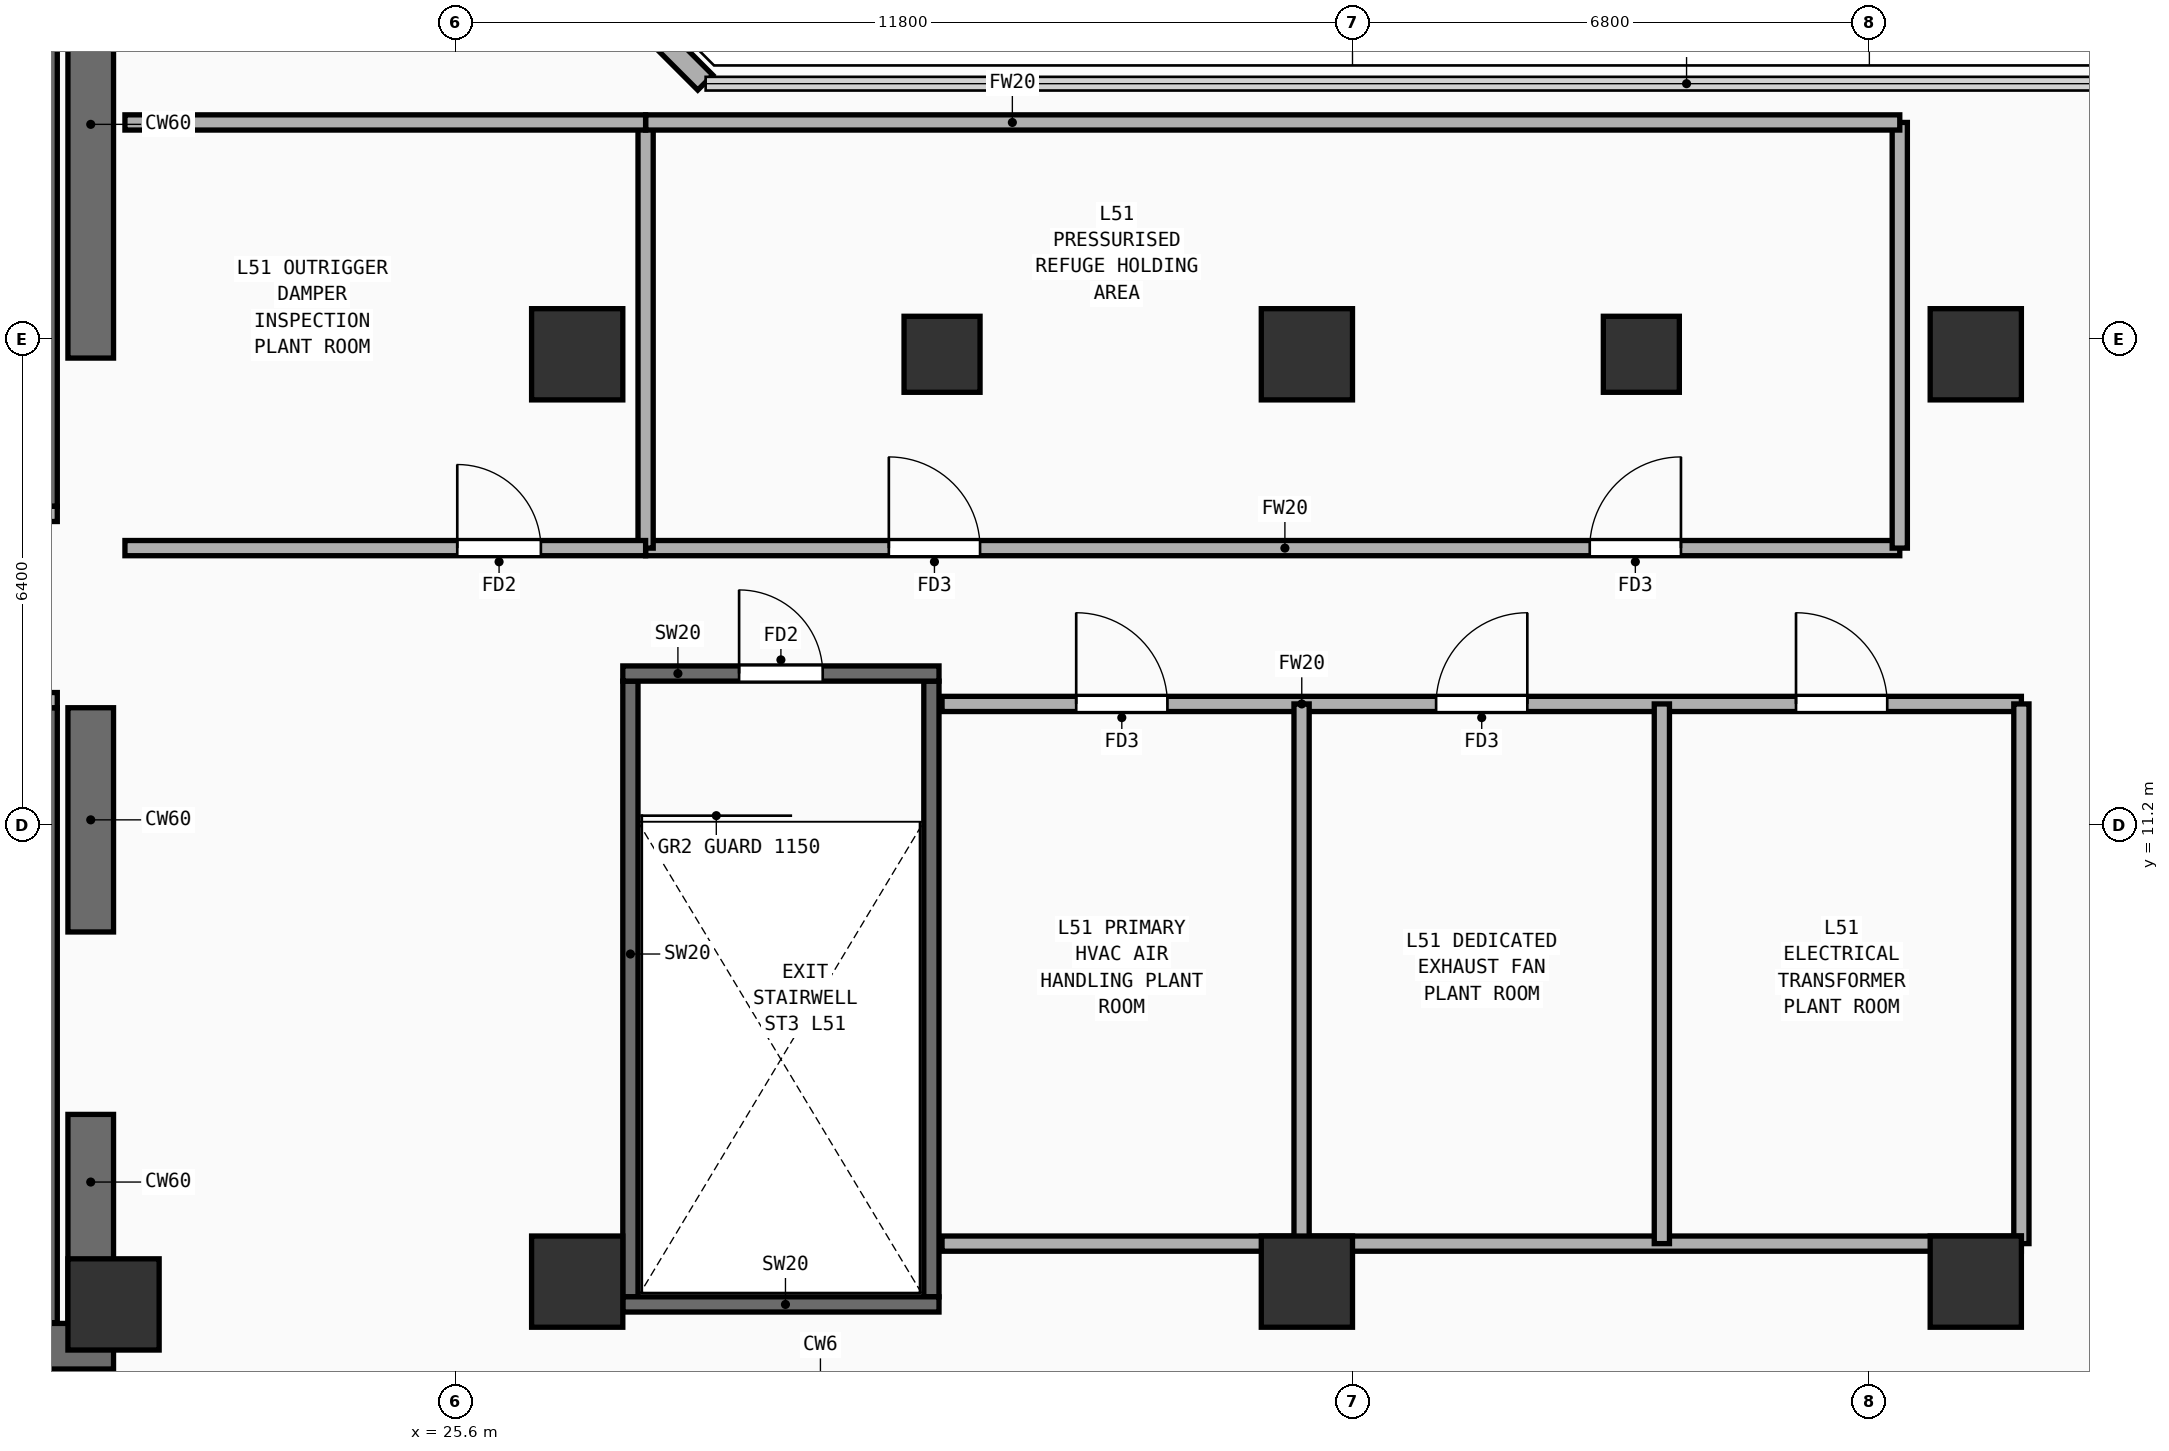
"""IFC4 building model, lengths in metres.
Left out: names, types, materials, properties, quantities, classifications, styles, units other than length and angle.
Written with IfcOpenShell. Run it as: python <this file> out.ifc"""

import sys

from ifc_helpers import new_model, si_unit, direction, frame, frame_2d, origin, origin_2d, place, context, subcontext, project, spatial, rectangle, extrude, element, fill, save


model = new_model("IFC4")
c1 = context("Model", 3, precision=1e-05, world=origin(), true_north=direction((0.0, 1.0)))
c2 = subcontext(c1, "Body", "Model", "MODEL_VIEW")
j1 = project(units=[si_unit("LENGTHUNIT", "METRE"), si_unit("PLANEANGLEUNIT", "RADIAN")], contexts=[c1])
p1 = place(None, origin())
s1 = spatial("IfcSite", under=j1, at=p1, CompositionType="ELEMENT")
p2 = place(p1, origin())
s2 = spatial("IfcBuilding", under=s1, at=p2, CompositionType="ELEMENT")
p3 = place(p2, frame((0.0, 0.0, 199.4)))
s3 = spatial("IfcBuildingStorey", under=s2, at=p3, CompositionType="ELEMENT", Elevation=199.4)
p4 = place(p3, frame((7.15, 4.35, 0.0), z_axis=(0.0, 0.0, 1.0), x_axis=(1.0, 0.0, 0.0)))
e1 = element("IfcWall", 1, at=p4, inside=s3, PredefinedType="SHEAR", context=c2, shape_type="SweptSolid", body=[
    extrude(rectangle(XDim=13.95, YDim=0.6, at=frame_2d((6.975, 0.0))), origin(), (0.0, 0.0, 1.0), 4.86),
])
p5 = place(p3, frame((20.8, 4.65, 0.0), z_axis=(0.0, 0.0, 1.0), x_axis=(0.0, 1.0, 0.0)))
e2 = element("IfcWall", 2, at=p5, inside=s3, PredefinedType="SHEAR", context=c2, shape_type="SweptSolid", body=[
    extrude(rectangle(XDim=2.75, YDim=0.6, at=frame_2d((1.375, 0.0))), origin(), (0.0, 0.0, 1.0), 4.86),
])
p6 = place(p3, frame((20.8, 9.8, 0.0), z_axis=(0.0, 0.0, 1.0), x_axis=(0.0, 1.0, 0.0)))
e3 = element("IfcWall", 3, at=p6, inside=s3, PredefinedType="SHEAR", context=c2, shape_type="SweptSolid", body=[
    extrude(rectangle(XDim=2.95, YDim=0.6, at=frame_2d((1.475, 0.0))), origin(), (0.0, 0.0, 1.0), 4.86),
])
p7 = place(p3, frame((20.8, 17.35, 0.0), z_axis=(0.0, 0.0, 1.0), x_axis=(0.0, 1.0, 0.0)))
e4 = element("IfcWall", 4, at=p7, inside=s3, PredefinedType="SHEAR", context=c2, shape_type="SweptSolid", body=[
    extrude(rectangle(XDim=6.15, YDim=0.6, at=frame_2d((3.075, 0.0))), origin(), (0.0, 0.0, 1.0), 4.86),
])
for number, where, z_axis, x_axis in (
    (5, (21.1, 4.9, 0.0), (0.0, 0.0, 1.0), (1.0, 0.0, 0.0)),
    (6, (27.2, 5.2, 0.0), (0.0, 0.0, 1.0), (1.0, 0.0, 0.0)),
    (7, (36.8, 5.2, 0.0), (0.0, 0.0, 1.0), (1.0, 0.0, 0.0)),
    (8, (45.6, 5.2, 0.0), (0.0, 0.0, 1.0), (1.0, 0.0, 0.0)),
    (9, (27.2, 17.4, 0.0), (0.0, 0.0, 1.0), (1.0, 0.0, 0.0)),
    (10, (36.8, 17.4, 0.0), (0.0, 0.0, 1.0), (1.0, 0.0, 0.0)),
    (11, (45.6, 17.4, 0.0), (0.0, 0.0, 1.0), (1.0, 0.0, 0.0)),
):
    element("IfcColumn", number, at=place(p3, frame(where, z_axis=z_axis, x_axis=x_axis)), inside=s3, PredefinedType="COLUMN", context=c2, shape_type="SweptSolid", body=[
        extrude(rectangle(XDim=1.2, YDim=1.2, at=origin_2d()), origin(), (0.0, 0.0, 1.0), 4.86),
    ])
for number, where, z_axis, x_axis in (
    (12, (32.0, 17.4, 0.0), (0.0, 0.0, 1.0), (1.0, 0.0, 0.0)),
    (13, (41.2, 17.4, 0.0), (0.0, 0.0, 1.0), (1.0, 0.0, 0.0)),
):
    element("IfcColumn", number, at=place(p3, frame(where, z_axis=z_axis, x_axis=x_axis)), inside=s3, PredefinedType="COLUMN", context=c2, shape_type="SweptSolid", body=[
        extrude(rectangle(XDim=1.0, YDim=1.0, at=origin_2d()), origin(), (0.0, 0.0, 1.0), 4.86),
    ])
p8 = place(p3, frame((28.885, 20.975, 0.0), z_axis=(0.0, 0.0, 1.0), x_axis=(-0.707106781187, 0.707106781187, 0.0)))
e14 = element("IfcWall", 14, at=p8, inside=s3, PredefinedType="SOLIDWALL", context=c2, shape_type="SweptSolid", body=[
    extrude(rectangle(XDim=9.207, YDim=0.28, at=frame_2d((4.603, 0.0))), origin(), (0.0, 0.0, 1.0), 4.86),
])
p9 = place(p3, frame((20.26, 4.66, 0.0), z_axis=(0.0, 0.0, 1.0), x_axis=(0.0, 1.0, 0.0)))
e15 = element("IfcWall", 15, at=p9, inside=s3, PredefinedType="SHEAR", context=c2, shape_type="SweptSolid", body=[
    extrude(rectangle(XDim=8.09, YDim=0.2, at=frame_2d((4.045, 0.0))), origin(), (0.0, 0.0, 1.0), 4.86),
])
p10 = place(p3, frame((16.4, 12.85, 0.0), z_axis=(0.0, 0.0, 1.0), x_axis=(1.0, 0.0, 0.0)))
e16 = element("IfcWall", 16, at=p10, inside=s3, PredefinedType="PARTITIONING", context=c2, shape_type="SweptSolid", body=[
    extrude(rectangle(XDim=3.96, YDim=0.2, at=frame_2d((1.98, 0.0))), origin(), (0.0, 0.0, 1.0), 4.86),
])
p11 = place(p10, frame((1.304, 0.0, 0.0)))
e17 = element("IfcOpeningElement", 17, at=p11, cuts=e16, PredefinedType="OPENING", context=c2, shape_type="SweptSolid", body=[
    extrude(rectangle(XDim=1.1, YDim=2.2, at=frame_2d((0.55, 1.1))), frame((0.0, 0.11, 0.0), z_axis=(0.0, -1.0, 0.0), x_axis=(1.0, 0.0, 0.0)), (0.0, 0.0, 1.0), 0.22),
])
p12 = place(p3, frame((20.26, 15.4, 0.0), z_axis=(0.0, 0.0, 1.0), x_axis=(0.0, 1.0, 0.0)))
e18 = element("IfcWall", 18, at=p12, inside=s3, PredefinedType="SHEAR", context=c2, shape_type="SweptSolid", body=[
    extrude(rectangle(XDim=8.09, YDim=0.2, at=frame_2d((4.045, 0.0))), origin(), (0.0, 0.0, 1.0), 4.86),
])
p13 = place(p3, frame((16.41, 15.3, 0.0), z_axis=(0.0, 0.0, 1.0), x_axis=(1.0, 0.0, 0.0)))
e19 = element("IfcWall", 19, at=p13, inside=s3, PredefinedType="PARTITIONING", context=c2, shape_type="SweptSolid", body=[
    extrude(rectangle(XDim=3.95, YDim=0.2, at=frame_2d((1.975, 0.0))), origin(), (0.0, 0.0, 1.0), 4.86),
])
p14 = place(p13, frame((1.294, 0.0, 0.0)))
e20 = element("IfcOpeningElement", 20, at=p14, cuts=e19, PredefinedType="OPENING", context=c2, shape_type="SweptSolid", body=[
    extrude(rectangle(XDim=1.1, YDim=2.2, at=frame_2d((0.55, 1.1))), frame((0.0, 0.11, 0.0), z_axis=(0.0, -1.0, 0.0), x_axis=(1.0, 0.0, 0.0)), (0.0, 0.0, 1.0), 0.22),
])
for number, where, z_axis, x_axis in (
    (21, (27.9, 5.0, 0.0), (0.0, 0.0, 1.0), (0.0, 1.0, 0.0)),
    (22, (31.86, 5.0, 0.0), (0.0, 0.0, 1.0), (0.0, 1.0, 0.0)),
):
    element("IfcWall", number, at=place(p3, frame(where, z_axis=z_axis, x_axis=x_axis)), inside=s3, PredefinedType="SHEAR", context=c2, shape_type="SweptSolid", body=[
        extrude(rectangle(XDim=8.1, YDim=0.2, at=frame_2d((4.05, 0.0))), origin(), (0.0, 0.0, 1.0), 4.86),
    ])
p15 = place(p3, frame((27.8, 4.9, 0.0), z_axis=(0.0, 0.0, 1.0), x_axis=(1.0, 0.0, 0.0)))
e23 = element("IfcWall", 23, at=p15, inside=s3, PredefinedType="SHEAR", context=c2, shape_type="SweptSolid", body=[
    extrude(rectangle(XDim=4.16, YDim=0.2, at=frame_2d((2.08, 0.0))), origin(), (0.0, 0.0, 1.0), 4.86),
])
p16 = place(p3, frame((27.8, 13.2, 0.0), z_axis=(0.0, 0.0, 1.0), x_axis=(1.0, 0.0, 0.0)))
e24 = element("IfcWall", 24, at=p16, inside=s3, PredefinedType="SHEAR", context=c2, shape_type="SweptSolid", body=[
    extrude(rectangle(XDim=4.16, YDim=0.2, at=frame_2d((2.08, 0.0))), origin(), (0.0, 0.0, 1.0), 4.86),
])
p17 = place(p16, frame((1.53, 0.0, 0.0)))
e25 = element("IfcOpeningElement", 25, at=p17, cuts=e24, PredefinedType="OPENING", context=c2, shape_type="SweptSolid", body=[
    extrude(rectangle(XDim=1.1, YDim=2.2, at=frame_2d((0.55, 1.1))), frame((0.0, 0.11, 0.0), z_axis=(0.0, -1.0, 0.0), x_axis=(1.0, 0.0, 0.0)), (0.0, 0.0, 1.0), 0.22),
])
p18 = place(p3, frame((28.1, 14.85, 0.0), z_axis=(0.0, 0.0, 1.0), x_axis=(1.0, 0.0, 0.0)))
e26 = element("IfcWall", 26, at=p18, inside=s3, PredefinedType="PARTITIONING", context=c2, shape_type="SweptSolid", body=[
    extrude(rectangle(XDim=16.5, YDim=0.2, at=frame_2d((8.25, 0.0))), origin(), (0.0, 0.0, 1.0), 4.86),
])
p19 = place(p18, frame((3.2, 0.0, 0.0)))
e27 = element("IfcOpeningElement", 27, at=p19, cuts=e26, PredefinedType="OPENING", context=c2, shape_type="SweptSolid", body=[
    extrude(rectangle(XDim=1.2, YDim=2.25, at=frame_2d((0.6, 1.125))), frame((0.0, 0.11, 0.0), z_axis=(0.0, -1.0, 0.0), x_axis=(1.0, 0.0, 0.0)), (0.0, 0.0, 1.0), 0.22),
])
p20 = place(p18, frame((12.421, 0.0, 0.0)))
e28 = element("IfcOpeningElement", 28, at=p20, cuts=e26, PredefinedType="OPENING", context=c2, shape_type="SweptSolid", body=[
    extrude(rectangle(XDim=1.2, YDim=2.25, at=frame_2d((0.6, 1.125))), frame((0.0, 0.11, 0.0), z_axis=(0.0, -1.0, 0.0), x_axis=(1.0, 0.0, 0.0)), (0.0, 0.0, 1.0), 0.22),
])
for number, where, z_axis, x_axis in (
    (29, (28.1, 14.85, 0.0), (0.0, 0.0, 1.0), (0.0, 1.0, 0.0)),
    (30, (44.6, 14.85, 0.0), (0.0, 0.0, 1.0), (0.0, 1.0, 0.0)),
):
    element("IfcWall", number, at=place(p3, frame(where, z_axis=z_axis, x_axis=x_axis)), inside=s3, PredefinedType="PARTITIONING", context=c2, shape_type="SweptSolid", body=[
        extrude(rectangle(XDim=5.6, YDim=0.2, at=frame_2d((2.8, 0.0))), origin(), (0.0, 0.0, 1.0), 4.86),
    ])
p21 = place(p3, frame((28.1, 20.45, 0.0), z_axis=(0.0, 0.0, 1.0), x_axis=(1.0, 0.0, 0.0)))
e31 = element("IfcWall", 31, at=p21, inside=s3, PredefinedType="PARTITIONING", context=c2, shape_type="SweptSolid", body=[
    extrude(rectangle(XDim=16.5, YDim=0.2, at=frame_2d((8.25, 0.0))), origin(), (0.0, 0.0, 1.0), 4.86),
])
p22 = place(p3, frame((21.25, 14.85, 0.0), z_axis=(0.0, 0.0, 1.0), x_axis=(1.0, 0.0, 0.0)))
e32 = element("IfcWall", 32, at=p22, inside=s3, PredefinedType="PARTITIONING", context=c2, shape_type="SweptSolid", body=[
    extrude(rectangle(XDim=6.85, YDim=0.2, at=frame_2d((3.425, 0.0))), origin(), (0.0, 0.0, 1.0), 4.86),
])
p23 = place(p22, frame((4.372, 0.0, 0.0)))
e33 = element("IfcOpeningElement", 33, at=p23, cuts=e32, PredefinedType="OPENING", context=c2, shape_type="SweptSolid", body=[
    extrude(rectangle(XDim=1.1, YDim=2.2, at=frame_2d((0.55, 1.1))), frame((0.0, 0.11, 0.0), z_axis=(0.0, -1.0, 0.0), x_axis=(1.0, 0.0, 0.0)), (0.0, 0.0, 1.0), 0.22),
])
p24 = place(p3, frame((21.25, 20.45, 0.0), z_axis=(0.0, 0.0, 1.0), x_axis=(1.0, 0.0, 0.0)))
e34 = element("IfcWall", 34, at=p24, inside=s3, PredefinedType="PARTITIONING", context=c2, shape_type="SweptSolid", body=[
    extrude(rectangle(XDim=6.85, YDim=0.2, at=frame_2d((3.425, 0.0))), origin(), (0.0, 0.0, 1.0), 4.86),
])
p25 = place(p3, frame((32.0, 12.8, 0.0), z_axis=(0.0, 0.0, 1.0), x_axis=(1.0, 0.0, 0.0)))
e35 = element("IfcWall", 35, at=p25, inside=s3, PredefinedType="PARTITIONING", context=c2, shape_type="SweptSolid", body=[
    extrude(rectangle(XDim=14.2, YDim=0.2, at=frame_2d((7.1, 0.0))), origin(), (0.0, 0.0, 1.0), 4.86),
])
p26 = place(p25, frame((1.765, 0.0, 0.0)))
e36 = element("IfcOpeningElement", 36, at=p26, cuts=e35, PredefinedType="OPENING", context=c2, shape_type="SweptSolid", body=[
    extrude(rectangle(XDim=1.2, YDim=2.25, at=frame_2d((0.6, 1.125))), frame((0.0, 0.11, 0.0), z_axis=(0.0, -1.0, 0.0), x_axis=(1.0, 0.0, 0.0)), (0.0, 0.0, 1.0), 0.22),
])
p27 = place(p25, frame((6.5, 0.0, 0.0)))
e37 = element("IfcOpeningElement", 37, at=p27, cuts=e35, PredefinedType="OPENING", context=c2, shape_type="SweptSolid", body=[
    extrude(rectangle(XDim=1.2, YDim=2.25, at=frame_2d((0.6, 1.125))), frame((0.0, 0.11, 0.0), z_axis=(0.0, -1.0, 0.0), x_axis=(1.0, 0.0, 0.0)), (0.0, 0.0, 1.0), 0.22),
])
p28 = place(p25, frame((11.235, 0.0, 0.0)))
e38 = element("IfcOpeningElement", 38, at=p28, cuts=e35, PredefinedType="OPENING", context=c2, shape_type="SweptSolid", body=[
    extrude(rectangle(XDim=1.2, YDim=2.25, at=frame_2d((0.6, 1.125))), frame((0.0, 0.11, 0.0), z_axis=(0.0, -1.0, 0.0), x_axis=(1.0, 0.0, 0.0)), (0.0, 0.0, 1.0), 0.22),
])
p29 = place(p3, frame((46.2, 5.7, 0.0), z_axis=(0.0, 0.0, 1.0), x_axis=(0.0, 1.0, 0.0)))
e39 = element("IfcWall", 39, at=p29, inside=s3, PredefinedType="PARTITIONING", context=c2, shape_type="SweptSolid", body=[
    extrude(rectangle(XDim=7.1, YDim=0.2, at=frame_2d((3.55, 0.0))), origin(), (0.0, 0.0, 1.0), 4.86),
])
p30 = place(p3, frame((32.0, 5.7, 0.0), z_axis=(0.0, 0.0, 1.0), x_axis=(1.0, 0.0, 0.0)))
e40 = element("IfcWall", 40, at=p30, inside=s3, PredefinedType="PARTITIONING", context=c2, shape_type="SweptSolid", body=[
    extrude(rectangle(XDim=14.2, YDim=0.2, at=frame_2d((7.1, 0.0))), origin(), (0.0, 0.0, 1.0), 4.86),
])
p31 = place(p3, frame((36.73, 5.7, 0.0), z_axis=(0.0, 0.0, 1.0), x_axis=(0.0, 1.0, 0.0)))
e41 = element("IfcWall", 41, at=p31, inside=s3, PredefinedType="PARTITIONING", context=c2, shape_type="SweptSolid", body=[
    extrude(rectangle(XDim=7.1, YDim=0.2, at=frame_2d((3.55, 0.0))), origin(), (0.0, 0.0, 1.0), 4.06),
])
p32 = place(p3, frame((41.47, 5.7, 0.0), z_axis=(0.0, 0.0, 1.0), x_axis=(0.0, 1.0, 0.0)))
e42 = element("IfcWall", 42, at=p32, inside=s3, PredefinedType="PARTITIONING", context=c2, shape_type="SweptSolid", body=[
    extrude(rectangle(XDim=7.1, YDim=0.2, at=frame_2d((3.55, 0.0))), origin(), (0.0, 0.0, 1.0), 4.86),
])
p33 = place(p17, frame((1.1, 0.0, 0.0), z_axis=(0.0, 0.0, 1.0), x_axis=(-1.0, 0.0, 0.0)))
e43 = element("IfcDoor", 43, at=p33, inside=s3, OperationType="SINGLE_SWING_RIGHT", PredefinedType="DOOR", context=c2, shape_type="SweptSolid", body=[
    extrude(rectangle(XDim=1.1, YDim=2.2, at=frame_2d((0.55, 1.1))), frame((0.0, 0.025, 0.0), z_axis=(0.0, -1.0, 0.0), x_axis=(1.0, 0.0, 0.0)), (0.0, 0.0, 1.0), 0.05),
])
fill(e25, e43)
p34 = place(p19, origin())
e44 = element("IfcDoor", 44, at=p34, inside=s3, OperationType="SINGLE_SWING_LEFT", PredefinedType="DOOR", context=c2, shape_type="SweptSolid", body=[
    extrude(rectangle(XDim=1.2, YDim=2.25, at=frame_2d((0.6, 1.125))), frame((0.0, 0.025, 0.0), z_axis=(0.0, -1.0, 0.0), x_axis=(1.0, 0.0, 0.0)), (0.0, 0.0, 1.0), 0.05),
])
fill(e27, e44)
p35 = place(p20, origin())
e45 = element("IfcDoor", 45, at=p35, inside=s3, OperationType="SINGLE_SWING_RIGHT", PredefinedType="DOOR", context=c2, shape_type="SweptSolid", body=[
    extrude(rectangle(XDim=1.2, YDim=2.25, at=frame_2d((0.6, 1.125))), frame((0.0, 0.025, 0.0), z_axis=(0.0, -1.0, 0.0), x_axis=(1.0, 0.0, 0.0)), (0.0, 0.0, 1.0), 0.05),
])
fill(e28, e45)
p36 = place(p23, origin())
e46 = element("IfcDoor", 46, at=p36, inside=s3, OperationType="SINGLE_SWING_LEFT", PredefinedType="DOOR", context=c2, shape_type="SweptSolid", body=[
    extrude(rectangle(XDim=1.1, YDim=2.2, at=frame_2d((0.55, 1.1))), frame((0.0, 0.025, 0.0), z_axis=(0.0, -1.0, 0.0), x_axis=(1.0, 0.0, 0.0)), (0.0, 0.0, 1.0), 0.05),
])
fill(e33, e46)
p37 = place(p26, origin())
e47 = element("IfcDoor", 47, at=p37, inside=s3, OperationType="SINGLE_SWING_LEFT", PredefinedType="DOOR", context=c2, shape_type="SweptSolid", body=[
    extrude(rectangle(XDim=1.2, YDim=2.25, at=frame_2d((0.6, 1.125))), frame((0.0, 0.025, 0.0), z_axis=(0.0, -1.0, 0.0), x_axis=(1.0, 0.0, 0.0)), (0.0, 0.0, 1.0), 0.05),
])
fill(e36, e47)
p38 = place(p27, origin())
e48 = element("IfcDoor", 48, at=p38, inside=s3, OperationType="SINGLE_SWING_RIGHT", PredefinedType="DOOR", context=c2, shape_type="SweptSolid", body=[
    extrude(rectangle(XDim=1.2, YDim=2.25, at=frame_2d((0.6, 1.125))), frame((0.0, 0.025, 0.0), z_axis=(0.0, -1.0, 0.0), x_axis=(1.0, 0.0, 0.0)), (0.0, 0.0, 1.0), 0.05),
])
fill(e37, e48)
p39 = place(p28, origin())
e49 = element("IfcDoor", 49, at=p39, inside=s3, OperationType="SINGLE_SWING_LEFT", PredefinedType="DOOR", context=c2, shape_type="SweptSolid", body=[
    extrude(rectangle(XDim=1.2, YDim=2.25, at=frame_2d((0.6, 1.125))), frame((0.0, 0.025, 0.0), z_axis=(0.0, -1.0, 0.0), x_axis=(1.0, 0.0, 0.0)), (0.0, 0.0, 1.0), 0.05),
])
fill(e38, e49)
save(model, sys.argv[1])
